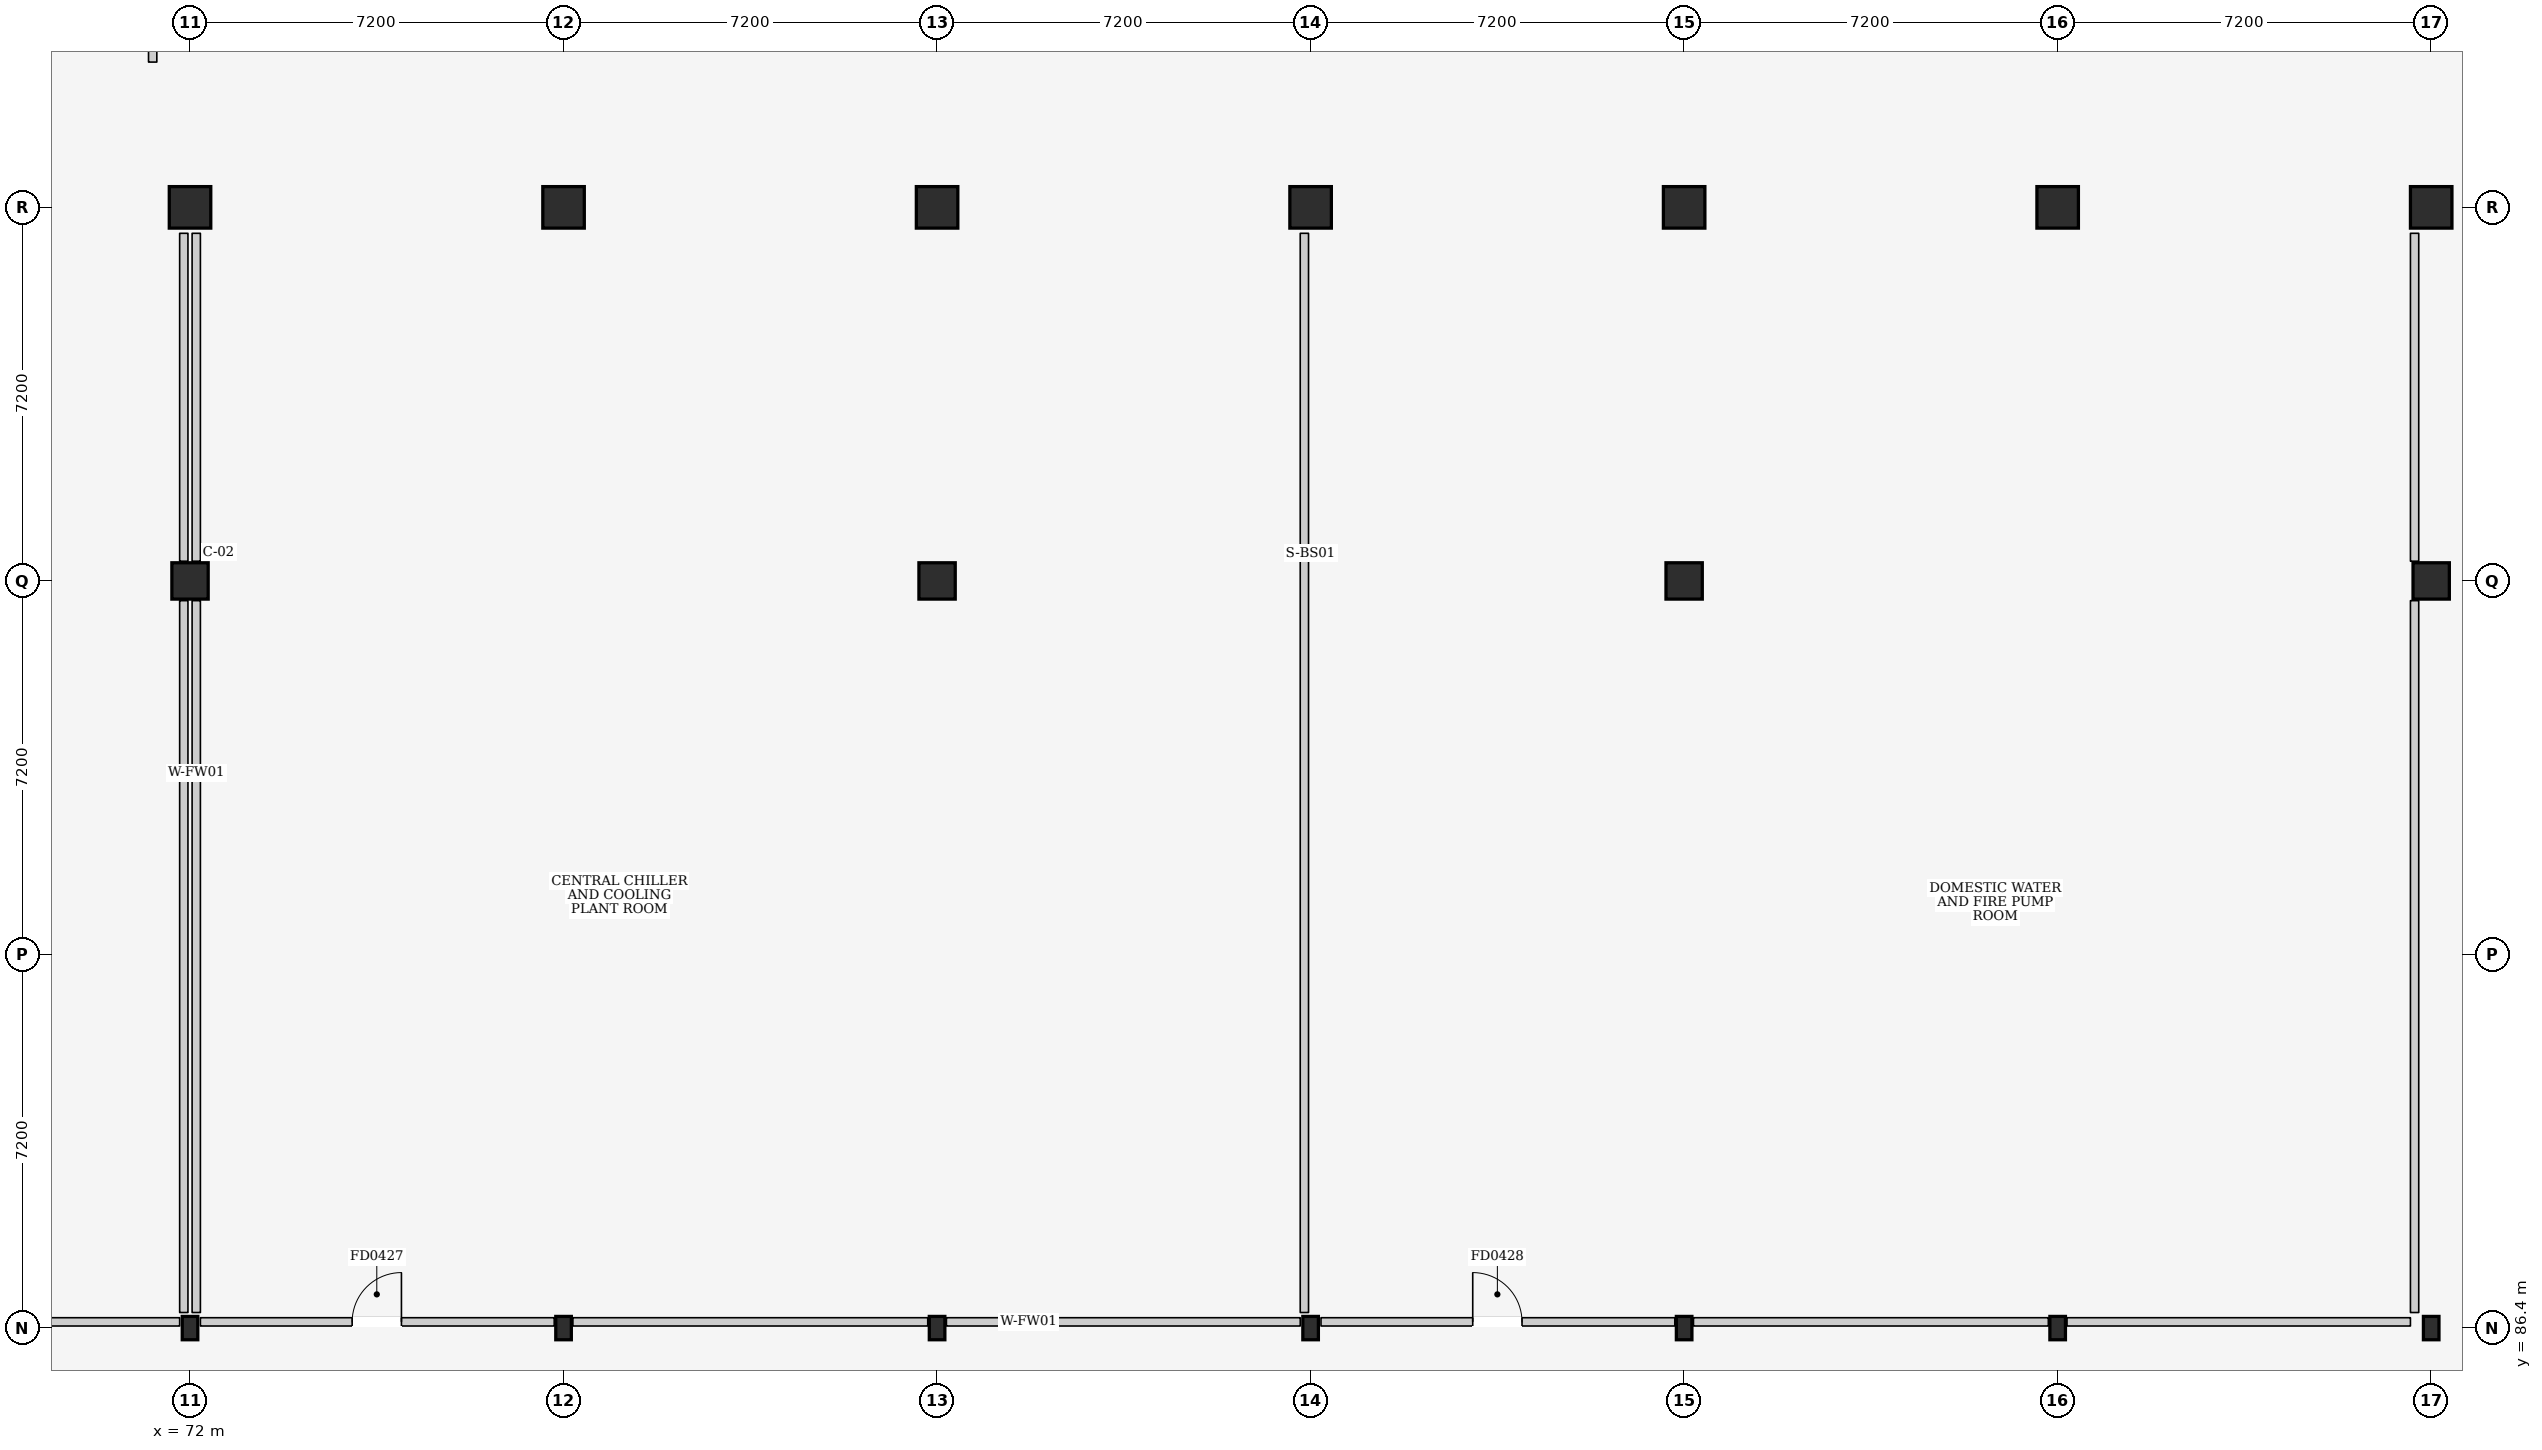
"""IFC4 building model, lengths in metres.
Left out: names, types, materials, properties, quantities, classifications, styles, units other than length and angle.
Written with IfcOpenShell. Run it as: python <this file> out.ifc"""

import sys

from ifc_helpers import new_model, si_unit, direction, frame, frame_2d, origin, origin_2d, place, context, subcontext, project, spatial, rectangle, i_section, extrude, element, fill, save


model = new_model("IFC4")
c1 = context("Model", 3, precision=1e-05, world=origin(), true_north=direction((0.0, 1.0)))
c2 = subcontext(c1, "Body", "Model", "MODEL_VIEW")
j1 = project(units=[si_unit("LENGTHUNIT", "METRE"), si_unit("PLANEANGLEUNIT", "RADIAN")], contexts=[c1])
p1 = place(None, origin())
s1 = spatial("IfcSite", under=j1, at=p1, CompositionType="ELEMENT")
p2 = place(p1, origin())
s2 = spatial("IfcBuilding", under=s1, at=p2, CompositionType="ELEMENT")
p3 = place(p2, frame((0.0, 0.0, -4.2)))
s3 = spatial("IfcBuildingStorey", under=s2, at=p3, CompositionType="ELEMENT", Elevation=-4.2)
p4 = place(p3, frame((72.0, 86.4, 0.0), z_axis=(0.0, 0.0, 1.0), x_axis=(1.0, 0.0, 0.0)))
e1 = element("IfcColumn", 1, at=p4, inside=s3, PredefinedType="COLUMN", context=c2, shape_type="SweptSolid", body=[
    extrude(i_section(OverallWidth=0.3, OverallDepth=0.45, WebThickness=0.014, FlangeThickness=0.026, at=origin_2d()), origin(), (0.0, 0.0, 1.0), 4.2),
])
p5 = place(p3, frame((72.0, 100.8, 0.0), z_axis=(0.0, 0.0, 1.0), x_axis=(1.0, 0.0, 0.0)))
e2 = element("IfcColumn", 2, at=p5, inside=s3, PredefinedType="COLUMN", context=c2, shape_type="SweptSolid", body=[
    extrude(rectangle(XDim=0.7, YDim=0.7, at=origin_2d()), origin(), (0.0, 0.0, 1.0), 3.98),
])
p6 = place(p3, frame((72.0, 108.0, 0.0), z_axis=(0.0, 0.0, 1.0), x_axis=(1.0, 0.0, 0.0)))
e3 = element("IfcColumn", 3, at=p6, inside=s3, PredefinedType="COLUMN", context=c2, shape_type="SweptSolid", body=[
    extrude(rectangle(XDim=0.8, YDim=0.8, at=origin_2d()), origin(), (0.0, 0.0, 1.0), 4.2),
])
p7 = place(p3, frame((79.2, 86.4, 0.0), z_axis=(0.0, 0.0, 1.0), x_axis=(1.0, 0.0, 0.0)))
e4 = element("IfcColumn", 4, at=p7, inside=s3, PredefinedType="COLUMN", context=c2, shape_type="SweptSolid", body=[
    extrude(i_section(OverallWidth=0.3, OverallDepth=0.45, WebThickness=0.014, FlangeThickness=0.026, at=origin_2d()), origin(), (0.0, 0.0, 1.0), 4.2),
])
p8 = place(p3, frame((79.2, 108.0, 0.0), z_axis=(0.0, 0.0, 1.0), x_axis=(1.0, 0.0, 0.0)))
e5 = element("IfcColumn", 5, at=p8, inside=s3, PredefinedType="COLUMN", context=c2, shape_type="SweptSolid", body=[
    extrude(rectangle(XDim=0.8, YDim=0.8, at=origin_2d()), origin(), (0.0, 0.0, 1.0), 4.2),
])
p9 = place(p3, frame((86.4, 86.4, 0.0), z_axis=(0.0, 0.0, 1.0), x_axis=(1.0, 0.0, 0.0)))
e6 = element("IfcColumn", 6, at=p9, inside=s3, PredefinedType="COLUMN", context=c2, shape_type="SweptSolid", body=[
    extrude(i_section(OverallWidth=0.3, OverallDepth=0.45, WebThickness=0.014, FlangeThickness=0.026, at=origin_2d()), origin(), (0.0, 0.0, 1.0), 4.2),
])
p10 = place(p3, frame((86.4, 100.8, 0.0), z_axis=(0.0, 0.0, 1.0), x_axis=(1.0, 0.0, 0.0)))
e7 = element("IfcColumn", 7, at=p10, inside=s3, PredefinedType="COLUMN", context=c2, shape_type="SweptSolid", body=[
    extrude(rectangle(XDim=0.7, YDim=0.7, at=origin_2d()), origin(), (0.0, 0.0, 1.0), 3.98),
])
p11 = place(p3, frame((86.4, 108.0, 0.0), z_axis=(0.0, 0.0, 1.0), x_axis=(1.0, 0.0, 0.0)))
e8 = element("IfcColumn", 8, at=p11, inside=s3, PredefinedType="COLUMN", context=c2, shape_type="SweptSolid", body=[
    extrude(rectangle(XDim=0.8, YDim=0.8, at=origin_2d()), origin(), (0.0, 0.0, 1.0), 4.2),
])
p12 = place(p3, frame((93.6, 86.4, 0.0), z_axis=(0.0, 0.0, 1.0), x_axis=(1.0, 0.0, 0.0)))
e9 = element("IfcColumn", 9, at=p12, inside=s3, PredefinedType="COLUMN", context=c2, shape_type="SweptSolid", body=[
    extrude(i_section(OverallWidth=0.3, OverallDepth=0.45, WebThickness=0.014, FlangeThickness=0.026, at=origin_2d()), origin(), (0.0, 0.0, 1.0), 4.2),
])
p13 = place(p3, frame((93.6, 108.0, 0.0), z_axis=(0.0, 0.0, 1.0), x_axis=(1.0, 0.0, 0.0)))
e10 = element("IfcColumn", 10, at=p13, inside=s3, PredefinedType="COLUMN", context=c2, shape_type="SweptSolid", body=[
    extrude(rectangle(XDim=0.8, YDim=0.8, at=origin_2d()), origin(), (0.0, 0.0, 1.0), 4.2),
])
p14 = place(p3, frame((100.8, 86.4, 0.0), z_axis=(0.0, 0.0, 1.0), x_axis=(1.0, 0.0, 0.0)))
e11 = element("IfcColumn", 11, at=p14, inside=s3, PredefinedType="COLUMN", context=c2, shape_type="SweptSolid", body=[
    extrude(i_section(OverallWidth=0.3, OverallDepth=0.45, WebThickness=0.014, FlangeThickness=0.026, at=origin_2d()), origin(), (0.0, 0.0, 1.0), 4.2),
])
p15 = place(p3, frame((100.8, 100.8, 0.0), z_axis=(0.0, 0.0, 1.0), x_axis=(1.0, 0.0, 0.0)))
e12 = element("IfcColumn", 12, at=p15, inside=s3, PredefinedType="COLUMN", context=c2, shape_type="SweptSolid", body=[
    extrude(rectangle(XDim=0.7, YDim=0.7, at=origin_2d()), origin(), (0.0, 0.0, 1.0), 3.98),
])
p16 = place(p3, frame((100.8, 108.0, 0.0), z_axis=(0.0, 0.0, 1.0), x_axis=(1.0, 0.0, 0.0)))
e13 = element("IfcColumn", 13, at=p16, inside=s3, PredefinedType="COLUMN", context=c2, shape_type="SweptSolid", body=[
    extrude(rectangle(XDim=0.8, YDim=0.8, at=origin_2d()), origin(), (0.0, 0.0, 1.0), 4.2),
])
p17 = place(p3, frame((108.0, 86.4, 0.0), z_axis=(0.0, 0.0, 1.0), x_axis=(1.0, 0.0, 0.0)))
e14 = element("IfcColumn", 14, at=p17, inside=s3, PredefinedType="COLUMN", context=c2, shape_type="SweptSolid", body=[
    extrude(i_section(OverallWidth=0.3, OverallDepth=0.45, WebThickness=0.014, FlangeThickness=0.026, at=origin_2d()), origin(), (0.0, 0.0, 1.0), 4.2),
])
p18 = place(p3, frame((108.0, 108.0, 0.0), z_axis=(0.0, 0.0, 1.0), x_axis=(1.0, 0.0, 0.0)))
e15 = element("IfcColumn", 15, at=p18, inside=s3, PredefinedType="COLUMN", context=c2, shape_type="SweptSolid", body=[
    extrude(rectangle(XDim=0.8, YDim=0.8, at=origin_2d()), origin(), (0.0, 0.0, 1.0), 4.2),
])
p19 = place(p3, frame((115.2, 86.4, 0.0), z_axis=(0.0, 0.0, 1.0), x_axis=(1.0, 0.0, 0.0)))
e16 = element("IfcColumn", 16, at=p19, inside=s3, PredefinedType="COLUMN", context=c2, shape_type="SweptSolid", body=[
    extrude(i_section(OverallWidth=0.3, OverallDepth=0.45, WebThickness=0.014, FlangeThickness=0.026, at=origin_2d()), origin(), (0.0, 0.0, 1.0), 4.2),
])
p20 = place(p3, frame((115.2, 100.8, 0.0), z_axis=(0.0, 0.0, 1.0), x_axis=(1.0, 0.0, 0.0)))
e17 = element("IfcColumn", 17, at=p20, inside=s3, PredefinedType="COLUMN", context=c2, shape_type="SweptSolid", body=[
    extrude(rectangle(XDim=0.7, YDim=0.7, at=origin_2d()), origin(), (0.0, 0.0, 1.0), 3.98),
])
p21 = place(p3, frame((115.2, 108.0, 0.0), z_axis=(0.0, 0.0, 1.0), x_axis=(1.0, 0.0, 0.0)))
e18 = element("IfcColumn", 18, at=p21, inside=s3, PredefinedType="COLUMN", context=c2, shape_type="SweptSolid", body=[
    extrude(rectangle(XDim=0.8, YDim=0.8, at=origin_2d()), origin(), (0.0, 0.0, 1.0), 4.2),
])
p22 = place(p3, frame((71.28, 110.8, 0.0), z_axis=(0.0, 0.0, 1.0), x_axis=(0.0, 1.0, 0.0)))
e19 = element("IfcWall", 19, at=p22, inside=s3, PredefinedType="PARTITIONING", context=c2, shape_type="SweptSolid", body=[
    extrude(rectangle(XDim=4.32, YDim=0.16, at=frame_2d((2.16, 0.0))), origin(), (0.0, 0.0, 1.0), 3.79),
])
p23 = place(p22, frame((2.4, 0.0, 0.0)))
e20 = element("IfcOpeningElement", 20, at=p23, cuts=e19, PredefinedType="OPENING", context=c2, shape_type="SweptSolid", body=[
    extrude(rectangle(XDim=1.2, YDim=2.2, at=frame_2d((0.6, 1.1))), frame((0.0, 0.095, 0.0), z_axis=(0.0, -1.0, 0.0), x_axis=(1.0, 0.0, 0.0)), (0.0, 0.0, 1.0), 0.19),
])
p24 = place(p3, frame((72.2, 86.52, 0.0), z_axis=(0.0, 0.0, 1.0), x_axis=(1.0, 0.0, 0.0)))
e21 = element("IfcWall", 21, at=p24, inside=s3, PredefinedType="PARTITIONING", context=c2, shape_type="SweptSolid", body=[
    extrude(rectangle(XDim=6.82, YDim=0.16, at=frame_2d((3.41, 0.0))), origin(), (0.0, 0.0, 1.0), 2.575),
])
p25 = place(p24, frame((2.925, 0.0, 0.0)))
e22 = element("IfcOpeningElement", 22, at=p25, cuts=e21, PredefinedType="OPENING", context=c2, shape_type="SweptSolid", body=[
    extrude(rectangle(XDim=0.95, YDim=2.1, at=frame_2d((0.475, 1.05))), frame((0.0, 0.095, 0.0), z_axis=(0.0, -1.0, 0.0), x_axis=(1.0, 0.0, 0.0)), (0.0, 0.0, 1.0), 0.19),
])
p26 = place(p3, frame((79.38, 86.52, 0.0), z_axis=(0.0, 0.0, 1.0), x_axis=(1.0, 0.0, 0.0)))
e23 = element("IfcWall", 23, at=p26, inside=s3, PredefinedType="PARTITIONING", context=c2, shape_type="SweptSolid", body=[
    extrude(rectangle(XDim=6.84, YDim=0.16, at=frame_2d((3.42, 0.0))), origin(), (0.0, 0.0, 1.0), 2.575),
])
p27 = place(p3, frame((86.58, 86.52, 0.0), z_axis=(0.0, 0.0, 1.0), x_axis=(1.0, 0.0, 0.0)))
e24 = element("IfcWall", 24, at=p27, inside=s3, PredefinedType="PARTITIONING", context=c2, shape_type="SweptSolid", body=[
    extrude(rectangle(XDim=6.82, YDim=0.16, at=frame_2d((3.41, 0.0))), origin(), (0.0, 0.0, 1.0), 2.575),
])
p28 = place(p3, frame((72.12, 86.7, 0.0), z_axis=(0.0, 0.0, 1.0), x_axis=(0.0, 1.0, 0.0)))
e25 = element("IfcWall", 25, at=p28, inside=s3, PredefinedType="PARTITIONING", context=c2, shape_type="SweptSolid", body=[
    extrude(rectangle(XDim=13.72, YDim=0.16, at=frame_2d((6.86, 0.0))), origin(), (0.0, 0.0, 1.0), 3.79),
])
p29 = place(p3, frame((72.12, 101.18, 0.0), z_axis=(0.0, 0.0, 1.0), x_axis=(0.0, 1.0, 0.0)))
e26 = element("IfcWall", 26, at=p29, inside=s3, PredefinedType="PARTITIONING", context=c2, shape_type="SweptSolid", body=[
    extrude(rectangle(XDim=6.32, YDim=0.16, at=frame_2d((3.16, 0.0))), origin(), (0.0, 0.0, 1.0), 3.79),
])
p30 = place(p3, frame((93.48, 86.7, 0.0), z_axis=(0.0, 0.0, 1.0), x_axis=(0.0, 1.0, 0.0)))
e27 = element("IfcWall", 27, at=p30, inside=s3, PredefinedType="PARTITIONING", context=c2, shape_type="SweptSolid", body=[
    extrude(rectangle(XDim=20.8, YDim=0.16, at=frame_2d((10.4, 0.0))), origin(), (0.0, 0.0, 1.0), 3.79),
])
p31 = place(p3, frame((93.8, 86.52, 0.0), z_axis=(0.0, 0.0, 1.0), x_axis=(1.0, 0.0, 0.0)))
e28 = element("IfcWall", 28, at=p31, inside=s3, PredefinedType="PARTITIONING", context=c2, shape_type="SweptSolid", body=[
    extrude(rectangle(XDim=6.82, YDim=0.16, at=frame_2d((3.41, 0.0))), origin(), (0.0, 0.0, 1.0), 2.575),
])
p32 = place(p31, frame((2.925, 0.0, 0.0)))
e29 = element("IfcOpeningElement", 29, at=p32, cuts=e28, PredefinedType="OPENING", context=c2, shape_type="SweptSolid", body=[
    extrude(rectangle(XDim=0.95, YDim=2.1, at=frame_2d((0.475, 1.05))), frame((0.0, 0.095, 0.0), z_axis=(0.0, -1.0, 0.0), x_axis=(1.0, 0.0, 0.0)), (0.0, 0.0, 1.0), 0.19),
])
p33 = place(p3, frame((100.98, 86.52, 0.0), z_axis=(0.0, 0.0, 1.0), x_axis=(1.0, 0.0, 0.0)))
e30 = element("IfcWall", 30, at=p33, inside=s3, PredefinedType="PARTITIONING", context=c2, shape_type="SweptSolid", body=[
    extrude(rectangle(XDim=6.84, YDim=0.16, at=frame_2d((3.42, 0.0))), origin(), (0.0, 0.0, 1.0), 2.575),
])
p34 = place(p3, frame((108.18, 86.52, 0.0), z_axis=(0.0, 0.0, 1.0), x_axis=(1.0, 0.0, 0.0)))
e31 = element("IfcWall", 31, at=p34, inside=s3, PredefinedType="PARTITIONING", context=c2, shape_type="SweptSolid", body=[
    extrude(rectangle(XDim=6.62, YDim=0.16, at=frame_2d((3.31, 0.0))), origin(), (0.0, 0.0, 1.0), 2.575),
])
p35 = place(p3, frame((114.88, 86.7, 0.0), z_axis=(0.0, 0.0, 1.0), x_axis=(0.0, 1.0, 0.0)))
e32 = element("IfcWall", 32, at=p35, inside=s3, PredefinedType="PARTITIONING", context=c2, shape_type="SweptSolid", body=[
    extrude(rectangle(XDim=13.72, YDim=0.16, at=frame_2d((6.86, 0.0))), origin(), (0.0, 0.0, 1.0), 3.79),
])
p36 = place(p3, frame((114.88, 101.18, 0.0), z_axis=(0.0, 0.0, 1.0), x_axis=(0.0, 1.0, 0.0)))
e33 = element("IfcWall", 33, at=p36, inside=s3, PredefinedType="PARTITIONING", context=c2, shape_type="SweptSolid", body=[
    extrude(rectangle(XDim=6.32, YDim=0.16, at=frame_2d((3.16, 0.0))), origin(), (0.0, 0.0, 1.0), 3.79),
])
p37 = place(p3, frame((64.98, 86.52, 0.0), z_axis=(0.0, 0.0, 1.0), x_axis=(1.0, 0.0, 0.0)))
e34 = element("IfcWall", 34, at=p37, inside=s3, PredefinedType="PARTITIONING", context=c2, shape_type="SweptSolid", body=[
    extrude(rectangle(XDim=6.82, YDim=0.16, at=frame_2d((3.41, 0.0))), origin(), (0.0, 0.0, 1.0), 2.575),
])
p38 = place(p3, frame((71.88, 86.7, 0.0), z_axis=(0.0, 0.0, 1.0), x_axis=(0.0, 1.0, 0.0)))
e35 = element("IfcWall", 35, at=p38, inside=s3, PredefinedType="PARTITIONING", context=c2, shape_type="SweptSolid", body=[
    extrude(rectangle(XDim=13.72, YDim=0.16, at=frame_2d((6.86, 0.0))), origin(), (0.0, 0.0, 1.0), 3.79),
])
p39 = place(p3, frame((71.88, 101.18, 0.0), z_axis=(0.0, 0.0, 1.0), x_axis=(0.0, 1.0, 0.0)))
e36 = element("IfcWall", 36, at=p39, inside=s3, PredefinedType="PARTITIONING", context=c2, shape_type="SweptSolid", body=[
    extrude(rectangle(XDim=6.32, YDim=0.16, at=frame_2d((3.16, 0.0))), origin(), (0.0, 0.0, 1.0), 3.79),
])
p40 = place(p25, origin())
e37 = element("IfcDoor", 37, at=p40, inside=s3, OperationType="SINGLE_SWING_RIGHT", PredefinedType="DOOR", context=c2, shape_type="SweptSolid", body=[
    extrude(rectangle(XDim=0.95, YDim=2.1, at=frame_2d((0.475, 1.05))), frame((0.0, 0.025, 0.0), z_axis=(0.0, -1.0, 0.0), x_axis=(1.0, 0.0, 0.0)), (0.0, 0.0, 1.0), 0.05),
])
fill(e22, e37)
p41 = place(p32, origin())
e38 = element("IfcDoor", 38, at=p41, inside=s3, OperationType="SINGLE_SWING_LEFT", PredefinedType="DOOR", context=c2, shape_type="SweptSolid", body=[
    extrude(rectangle(XDim=0.95, YDim=2.1, at=frame_2d((0.475, 1.05))), frame((0.0, 0.025, 0.0), z_axis=(0.0, -1.0, 0.0), x_axis=(1.0, 0.0, 0.0)), (0.0, 0.0, 1.0), 0.05),
])
fill(e29, e38)
save(model, sys.argv[1])
